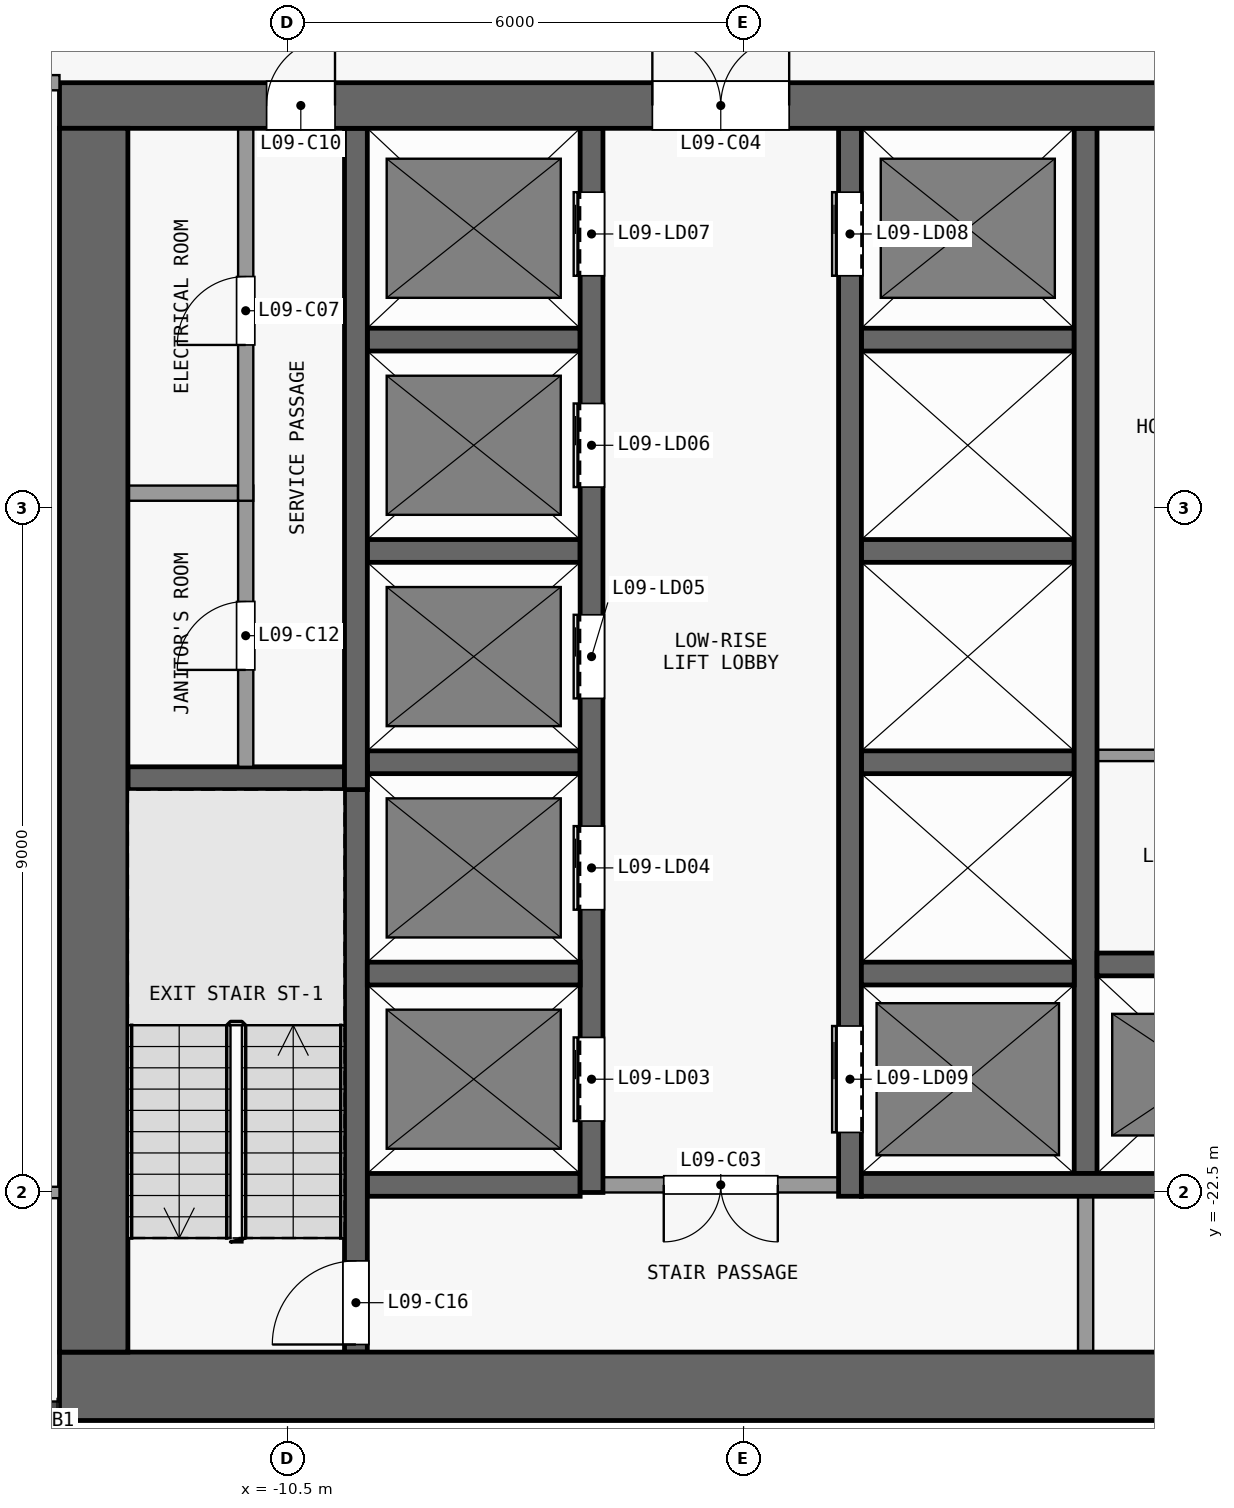
"""IFC4 building model, lengths in metres.
Left out: names, types, materials, properties, quantities, classifications, styles, units other than length and angle.
Written with IfcOpenShell. Run it as: python <this file> out.ifc"""

import sys

from ifc_helpers import new_model, si_unit, direction, frame, frame_2d, origin, place, context, subcontext, project, spatial, rectangle, extrude, element, fill, save


model = new_model("IFC4")
c1 = context("Model", 3, precision=1e-05, world=origin(), true_north=direction((0.0, 1.0)))
c2 = subcontext(c1, "Body", "Model", "MODEL_VIEW")
j1 = project(units=[si_unit("LENGTHUNIT", "METRE"), si_unit("PLANEANGLEUNIT", "RADIAN")], contexts=[c1])
p1 = place(None, origin())
s1 = spatial("IfcSite", under=j1, at=p1, CompositionType="ELEMENT")
p2 = place(p1, origin())
s2 = spatial("IfcBuilding", under=s1, at=p2, CompositionType="ELEMENT")
p3 = place(p2, frame((0.0, 0.0, 43.3)))
s3 = spatial("IfcBuildingStorey", under=s2, at=p3, CompositionType="ELEMENT", Elevation=43.3)
p4 = place(p3, frame((-13.5, -25.05, 0.0), z_axis=(0.0, 0.0, 1.0), x_axis=(1.0, 0.0, 0.0)))
e1 = element("IfcWall", 1, at=p4, inside=s3, PredefinedType="SHEAR", context=c2, shape_type="SweptSolid", body=[
    extrude(rectangle(XDim=27.0, YDim=0.9, at=frame_2d((13.5, 0.0))), origin(), (0.0, 0.0, 1.0), 3.3),
])
p5 = place(p3, frame((-13.5, -8.2, 0.0), z_axis=(0.0, 0.0, 1.0), x_axis=(1.0, 0.0, 0.0)))
e2 = element("IfcWall", 2, at=p5, inside=s3, PredefinedType="SHEAR", context=c2, shape_type="SweptSolid", body=[
    extrude(rectangle(XDim=27.0, YDim=0.6, at=frame_2d((13.5, 0.0))), origin(), (0.0, 0.0, 1.0), 3.3),
])
p6 = place(p5, frame((7.8, 0.0, 0.0)))
e3 = element("IfcOpeningElement", 3, at=p6, cuts=e2, PredefinedType="OPENING", context=c2, shape_type="SweptSolid", body=[
    extrude(rectangle(XDim=1.8, YDim=2.1, at=frame_2d((0.9, 1.05))), frame((0.0, 0.31, 0.0), z_axis=(0.0, -1.0, 0.0), x_axis=(1.0, 0.0, 0.0)), (0.0, 0.0, 1.0), 0.62),
])
p7 = place(p5, frame((17.4, 0.0, 0.0)))
e4 = element("IfcOpeningElement", 4, at=p7, cuts=e2, PredefinedType="OPENING", context=c2, shape_type="SweptSolid", body=[
    extrude(rectangle(XDim=1.8, YDim=2.1, at=frame_2d((0.9, 1.05))), frame((0.0, 0.31, 0.0), z_axis=(0.0, -1.0, 0.0), x_axis=(1.0, 0.0, 0.0)), (0.0, 0.0, 1.0), 0.62),
])
p8 = place(p5, frame((2.725, 0.0, 0.0)))
e5 = element("IfcOpeningElement", 5, at=p8, cuts=e2, PredefinedType="OPENING", context=c2, shape_type="SweptSolid", body=[
    extrude(rectangle(XDim=0.9, YDim=2.1, at=frame_2d((0.45, 1.05))), frame((0.0, 0.31, 0.0), z_axis=(0.0, -1.0, 0.0), x_axis=(1.0, 0.0, 0.0)), (0.0, 0.0, 1.0), 0.62),
])
p9 = place(p5, frame((23.375, 0.0, 0.0)))
e6 = element("IfcOpeningElement", 6, at=p9, cuts=e2, PredefinedType="OPENING", context=c2, shape_type="SweptSolid", body=[
    extrude(rectangle(XDim=0.9, YDim=2.1, at=frame_2d((0.45, 1.05))), frame((0.0, 0.31, 0.0), z_axis=(0.0, -1.0, 0.0), x_axis=(1.0, 0.0, 0.0)), (0.0, 0.0, 1.0), 0.62),
])
p10 = place(p3, frame((-13.05, -24.6, 0.0), z_axis=(0.0, 0.0, 1.0), x_axis=(0.0, 1.0, 0.0)))
e7 = element("IfcWall", 7, at=p10, inside=s3, PredefinedType="SHEAR", context=c2, shape_type="SweptSolid", body=[
    extrude(rectangle(XDim=16.1, YDim=0.9, at=frame_2d((8.05, 0.0))), origin(), (0.0, 0.0, 1.0), 3.3),
])
p11 = place(p3, frame((-9.45, -22.4, 0.0), z_axis=(0.0, 0.0, 1.0), x_axis=(1.0, 0.0, 0.0)))
e8 = element("IfcWall", 8, at=p11, inside=s3, PredefinedType="SHEAR", context=c2, shape_type="SweptSolid", body=[
    extrude(rectangle(XDim=2.8, YDim=0.3, at=frame_2d((1.4, 0.0))), origin(), (0.0, 0.0, 1.0), 3.3),
])
p12 = place(p3, frame((-3.25, -22.4, 0.0), z_axis=(0.0, 0.0, 1.0), x_axis=(-1.0, 0.0, 0.0)))
e9 = element("IfcWall", 9, at=p12, inside=s3, PredefinedType="PARTITIONING", context=c2, shape_type="SweptSolid", body=[
    extrude(rectangle(XDim=3.1, YDim=0.2, at=frame_2d((1.55, 0.0))), origin(), (0.0, 0.0, 1.0), 3.3),
])
p13 = place(p12, frame((0.8, 0.0, 0.0)))
e10 = element("IfcOpeningElement", 10, at=p13, cuts=e9, PredefinedType="OPENING", context=c2, shape_type="SweptSolid", body=[
    extrude(rectangle(XDim=1.5, YDim=2.1, at=frame_2d((0.75, 1.05))), frame((0.0, 0.11, 0.0), z_axis=(0.0, -1.0, 0.0), x_axis=(1.0, 0.0, 0.0)), (0.0, 0.0, 1.0), 0.22),
])
p14 = place(p3, frame((-2.95, -22.4, 0.0), z_axis=(0.0, 0.0, 1.0), x_axis=(1.0, 0.0, 0.0)))
e11 = element("IfcWall", 11, at=p14, inside=s3, PredefinedType="SHEAR", context=c2, shape_type="SweptSolid", body=[
    extrude(rectangle(XDim=6.2, YDim=0.3, at=frame_2d((3.1, 0.0))), origin(), (0.0, 0.0, 1.0), 3.3),
])
for number, where, z_axis, x_axis in (
    (12, (-9.45, -19.62, 0.0), (0.0, 0.0, 1.0), (1.0, 0.0, 0.0)),
    (13, (-2.95, -19.62, 0.0), (0.0, 0.0, 1.0), (1.0, 0.0, 0.0)),
):
    element("IfcWall", number, at=place(p3, frame(where, z_axis=z_axis, x_axis=x_axis)), inside=s3, PredefinedType="SHEAR", context=c2, shape_type="SweptSolid", body=[
        extrude(rectangle(XDim=2.8, YDim=0.3, at=frame_2d((1.4, 0.0))), origin(), (0.0, 0.0, 1.0), 3.3),
    ])
p15 = place(p3, frame((0.15, -19.5, 0.0), z_axis=(0.0, 0.0, 1.0), x_axis=(1.0, 0.0, 0.0)))
e14 = element("IfcWall", 14, at=p15, inside=s3, PredefinedType="SHEAR", context=c2, shape_type="SweptSolid", body=[
    extrude(rectangle(XDim=3.025, YDim=0.3, at=frame_2d((1.513, 0.0))), origin(), (0.0, 0.0, 1.0), 3.3),
])
p16 = place(p3, frame((-12.6, -17.05, 0.0), z_axis=(0.0, 0.0, 1.0), x_axis=(1.0, 0.0, 0.0)))
e15 = element("IfcWall", 15, at=p16, inside=s3, PredefinedType="SHEAR", context=c2, shape_type="SweptSolid", body=[
    extrude(rectangle(XDim=2.85, YDim=0.3, at=frame_2d((1.425, 0.0))), origin(), (0.0, 0.0, 1.0), 3.3),
])
for number, where, z_axis, x_axis in (
    (16, (-9.45, -16.84, 0.0), (0.0, 0.0, 1.0), (1.0, 0.0, 0.0)),
    (17, (-2.95, -16.84, 0.0), (0.0, 0.0, 1.0), (1.0, 0.0, 0.0)),
):
    element("IfcWall", number, at=place(p3, frame(where, z_axis=z_axis, x_axis=x_axis)), inside=s3, PredefinedType="SHEAR", context=c2, shape_type="SweptSolid", body=[
        extrude(rectangle(XDim=2.8, YDim=0.3, at=frame_2d((1.4, 0.0))), origin(), (0.0, 0.0, 1.0), 3.3),
    ])
p17 = place(p3, frame((0.15, -16.75, 0.0), z_axis=(0.0, 0.0, 1.0), x_axis=(1.0, 0.0, 0.0)))
e18 = element("IfcWall", 18, at=p17, inside=s3, PredefinedType="PARTITIONING", context=c2, shape_type="SweptSolid", body=[
    extrude(rectangle(XDim=2.875, YDim=0.15, at=frame_2d((1.438, 0.0))), origin(), (0.0, 0.0, 1.0), 3.3),
])
for number, where, z_axis, x_axis in (
    (19, (-9.45, -14.06, 0.0), (0.0, 0.0, 1.0), (1.0, 0.0, 0.0)),
    (20, (-2.95, -14.06, 0.0), (0.0, 0.0, 1.0), (1.0, 0.0, 0.0)),
):
    element("IfcWall", number, at=place(p3, frame(where, z_axis=z_axis, x_axis=x_axis)), inside=s3, PredefinedType="SHEAR", context=c2, shape_type="SweptSolid", body=[
        extrude(rectangle(XDim=2.8, YDim=0.3, at=frame_2d((1.4, 0.0))), origin(), (0.0, 0.0, 1.0), 3.3),
    ])
p18 = place(p3, frame((-12.6, -13.3, 0.0), z_axis=(0.0, 0.0, 1.0), x_axis=(1.0, 0.0, 0.0)))
e21 = element("IfcWall", 21, at=p18, inside=s3, PredefinedType="PARTITIONING", context=c2, shape_type="SweptSolid", body=[
    extrude(rectangle(XDim=1.45, YDim=0.2, at=frame_2d((0.725, 0.0))), origin(), (0.0, 0.0, 1.0), 3.3),
])
for number, where, z_axis, x_axis in (
    (22, (-9.45, -11.28, 0.0), (0.0, 0.0, 1.0), (1.0, 0.0, 0.0)),
    (23, (-2.95, -11.28, 0.0), (0.0, 0.0, 1.0), (1.0, 0.0, 0.0)),
):
    element("IfcWall", number, at=place(p3, frame(where, z_axis=z_axis, x_axis=x_axis)), inside=s3, PredefinedType="SHEAR", context=c2, shape_type="SweptSolid", body=[
        extrude(rectangle(XDim=2.8, YDim=0.3, at=frame_2d((1.4, 0.0))), origin(), (0.0, 0.0, 1.0), 3.3),
    ])
p19 = place(p3, frame((-11.05, -16.9, 0.0), z_axis=(0.0, 0.0, 1.0), x_axis=(0.0, 1.0, 0.0)))
e24 = element("IfcWall", 24, at=p19, inside=s3, PredefinedType="PARTITIONING", context=c2, shape_type="SweptSolid", body=[
    extrude(rectangle(XDim=3.7, YDim=0.2, at=frame_2d((1.85, 0.0))), origin(), (0.0, 0.0, 1.0), 3.3),
])
p20 = place(p19, frame((1.275, 0.0, 0.0)))
e25 = element("IfcOpeningElement", 25, at=p20, cuts=e24, PredefinedType="OPENING", context=c2, shape_type="SweptSolid", body=[
    extrude(rectangle(XDim=0.9, YDim=2.1, at=frame_2d((0.45, 1.05))), frame((0.0, 0.11, 0.0), z_axis=(0.0, -1.0, 0.0), x_axis=(1.0, 0.0, 0.0)), (0.0, 0.0, 1.0), 0.22),
])
p21 = place(p3, frame((-11.05, -13.4, 0.0), z_axis=(0.0, 0.0, 1.0), x_axis=(0.0, 1.0, 0.0)))
e26 = element("IfcWall", 26, at=p21, inside=s3, PredefinedType="PARTITIONING", context=c2, shape_type="SweptSolid", body=[
    extrude(rectangle(XDim=4.9, YDim=0.2, at=frame_2d((2.45, 0.0))), origin(), (0.0, 0.0, 1.0), 3.3),
])
p22 = place(p21, frame((2.05, 0.0, 0.0)))
e27 = element("IfcOpeningElement", 27, at=p22, cuts=e26, PredefinedType="OPENING", context=c2, shape_type="SweptSolid", body=[
    extrude(rectangle(XDim=0.9, YDim=2.1, at=frame_2d((0.45, 1.05))), frame((0.0, 0.11, 0.0), z_axis=(0.0, -1.0, 0.0), x_axis=(1.0, 0.0, 0.0)), (0.0, 0.0, 1.0), 0.22),
])
p23 = place(p3, frame((-9.6, -24.6, 0.0), z_axis=(0.0, 0.0, 1.0), x_axis=(0.0, 1.0, 0.0)))
e28 = element("IfcWall", 28, at=p23, inside=s3, PredefinedType="SHEAR", context=c2, shape_type="SweptSolid", body=[
    extrude(rectangle(XDim=7.7, YDim=0.3, at=frame_2d((3.85, 0.0))), origin(), (0.0, 0.0, 1.0), 3.3),
])
p24 = place(p23, frame((0.1, 0.0, 0.0)))
e29 = element("IfcOpeningElement", 29, at=p24, cuts=e28, PredefinedType="OPENING", context=c2, shape_type="SweptSolid", body=[
    extrude(rectangle(XDim=1.1, YDim=2.1, at=frame_2d((0.55, 1.05))), frame((0.0, 0.16, 0.0), z_axis=(0.0, -1.0, 0.0), x_axis=(1.0, 0.0, 0.0)), (0.0, 0.0, 1.0), 0.32),
])
p25 = place(p3, frame((-9.6, -17.2, 0.0), z_axis=(0.0, 0.0, 1.0), x_axis=(0.0, 1.0, 0.0)))
e30 = element("IfcWall", 30, at=p25, inside=s3, PredefinedType="SHEAR", context=c2, shape_type="SweptSolid", body=[
    extrude(rectangle(XDim=8.7, YDim=0.3, at=frame_2d((4.35, 0.0))), origin(), (0.0, 0.0, 1.0), 3.3),
])
p26 = place(p3, frame((-6.5, -22.5, 0.0), z_axis=(0.0, 0.0, 1.0), x_axis=(0.0, 1.0, 0.0)))
e31 = element("IfcWall", 31, at=p26, inside=s3, PredefinedType="SHEAR", context=c2, shape_type="SweptSolid", body=[
    extrude(rectangle(XDim=14.0, YDim=0.3, at=frame_2d((7.0, 0.0))), origin(), (0.0, 0.0, 1.0), 3.3),
])
p27 = place(p26, frame((0.94, 0.0, 0.0)))
e32 = element("IfcOpeningElement", 32, at=p27, cuts=e31, PredefinedType="OPENING", context=c2, shape_type="SweptSolid", body=[
    extrude(rectangle(XDim=1.1, YDim=2.1, at=frame_2d((0.55, 1.05))), frame((0.0, 0.16, 0.0), z_axis=(0.0, -1.0, 0.0), x_axis=(1.0, 0.0, 0.0)), (0.0, 0.0, 1.0), 0.32),
])
p28 = place(p26, frame((3.72, 0.0, 0.0)))
e33 = element("IfcOpeningElement", 33, at=p28, cuts=e31, PredefinedType="OPENING", context=c2, shape_type="SweptSolid", body=[
    extrude(rectangle(XDim=1.1, YDim=2.1, at=frame_2d((0.55, 1.05))), frame((0.0, 0.16, 0.0), z_axis=(0.0, -1.0, 0.0), x_axis=(1.0, 0.0, 0.0)), (0.0, 0.0, 1.0), 0.32),
])
p29 = place(p26, frame((6.5, 0.0, 0.0)))
e34 = element("IfcOpeningElement", 34, at=p29, cuts=e31, PredefinedType="OPENING", context=c2, shape_type="SweptSolid", body=[
    extrude(rectangle(XDim=1.1, YDim=2.1, at=frame_2d((0.55, 1.05))), frame((0.0, 0.16, 0.0), z_axis=(0.0, -1.0, 0.0), x_axis=(1.0, 0.0, 0.0)), (0.0, 0.0, 1.0), 0.32),
])
p30 = place(p26, frame((9.28, 0.0, 0.0)))
e35 = element("IfcOpeningElement", 35, at=p30, cuts=e31, PredefinedType="OPENING", context=c2, shape_type="SweptSolid", body=[
    extrude(rectangle(XDim=1.1, YDim=2.1, at=frame_2d((0.55, 1.05))), frame((0.0, 0.16, 0.0), z_axis=(0.0, -1.0, 0.0), x_axis=(1.0, 0.0, 0.0)), (0.0, 0.0, 1.0), 0.32),
])
p31 = place(p26, frame((12.06, 0.0, 0.0)))
e36 = element("IfcOpeningElement", 36, at=p31, cuts=e31, PredefinedType="OPENING", context=c2, shape_type="SweptSolid", body=[
    extrude(rectangle(XDim=1.1, YDim=2.1, at=frame_2d((0.55, 1.05))), frame((0.0, 0.16, 0.0), z_axis=(0.0, -1.0, 0.0), x_axis=(1.0, 0.0, 0.0)), (0.0, 0.0, 1.0), 0.32),
])
p32 = place(p3, frame((-3.1, -22.55, 0.0), z_axis=(0.0, 0.0, 1.0), x_axis=(0.0, 1.0, 0.0)))
e37 = element("IfcWall", 37, at=p32, inside=s3, PredefinedType="SHEAR", context=c2, shape_type="SweptSolid", body=[
    extrude(rectangle(XDim=14.05, YDim=0.3, at=frame_2d((7.025, 0.0))), origin(), (0.0, 0.0, 1.0), 3.3),
])
p33 = place(p32, frame((12.11, 0.0, 0.0)))
e38 = element("IfcOpeningElement", 38, at=p33, cuts=e37, PredefinedType="OPENING", context=c2, shape_type="SweptSolid", body=[
    extrude(rectangle(XDim=1.1, YDim=2.1, at=frame_2d((0.55, 1.05))), frame((0.0, 0.16, 0.0), z_axis=(0.0, -1.0, 0.0), x_axis=(1.0, 0.0, 0.0)), (0.0, 0.0, 1.0), 0.32),
])
p34 = place(p32, frame((0.84, 0.0, 0.0)))
e39 = element("IfcOpeningElement", 39, at=p34, cuts=e37, PredefinedType="OPENING", context=c2, shape_type="SweptSolid", body=[
    extrude(rectangle(XDim=1.4, YDim=2.1, at=frame_2d((0.7, 1.05))), frame((0.0, 0.16, 0.0), z_axis=(0.0, -1.0, 0.0), x_axis=(1.0, 0.0, 0.0)), (0.0, 0.0, 1.0), 0.32),
])
p35 = place(p3, frame((0.0, -24.6, 0.0), z_axis=(0.0, 0.0, 1.0), x_axis=(0.0, 1.0, 0.0)))
e40 = element("IfcWall", 40, at=p35, inside=s3, PredefinedType="PARTITIONING", context=c2, shape_type="SweptSolid", body=[
    extrude(rectangle(XDim=2.05, YDim=0.2, at=frame_2d((1.025, 0.0))), origin(), (0.0, 0.0, 1.0), 3.3),
])
p36 = place(p3, frame((0.0, -22.25, 0.0), z_axis=(0.0, 0.0, 1.0), x_axis=(0.0, 1.0, 0.0)))
e41 = element("IfcWall", 41, at=p36, inside=s3, PredefinedType="SHEAR", context=c2, shape_type="SweptSolid", body=[
    extrude(rectangle(XDim=13.75, YDim=0.3, at=frame_2d((6.875, 0.0))), origin(), (0.0, 0.0, 1.0), 3.3),
])
p37 = place(p3, frame((-16.425, -22.5, 0.0), z_axis=(0.0, 0.0, 1.0), x_axis=(1.0, 0.0, 0.0)))
e42 = element("IfcWall", 42, at=p37, inside=s3, PredefinedType="PARTITIONING", context=c2, shape_type="SweptSolid", body=[
    extrude(rectangle(XDim=2.925, YDim=0.15, at=frame_2d((1.462, 0.0))), origin(), (0.0, 0.0, 1.0), 3.3),
])
p38 = place(p37, frame((1.0, 0.0, 0.0)))
e43 = element("IfcOpeningElement", 43, at=p38, cuts=e42, PredefinedType="OPENING", context=c2, shape_type="SweptSolid", body=[
    extrude(rectangle(XDim=0.9, YDim=2.1, at=frame_2d((0.45, 1.05))), frame((0.0, 0.085, 0.0), z_axis=(0.0, -1.0, 0.0), x_axis=(1.0, 0.0, 0.0)), (0.0, 0.0, 1.0), 0.17),
])
p39 = place(p3, frame((-25.25, -7.9, 0.0), z_axis=(0.0, 0.0, 1.0), x_axis=(1.0, 0.0, 0.0)))
e44 = element("IfcWall", 44, at=p39, inside=s3, PredefinedType="PARTITIONING", context=c2, shape_type="SweptSolid", body=[
    extrude(rectangle(XDim=11.75, YDim=0.2, at=frame_2d((5.875, 0.0))), origin(), (0.0, 0.0, 1.0), 3.3),
])
p40 = place(p39, frame((9.75, 0.0, 0.0)))
e45 = element("IfcOpeningElement", 45, at=p40, cuts=e44, PredefinedType="OPENING", context=c2, shape_type="SweptSolid", body=[
    extrude(rectangle(XDim=1.0, YDim=2.1, at=frame_2d((0.5, 1.05))), frame((0.0, 0.11, 0.0), z_axis=(0.0, -1.0, 0.0), x_axis=(1.0, 0.0, 0.0)), (0.0, 0.0, 1.0), 0.22),
])
p41 = place(p27, origin())
e46 = element("IfcDoor", 46, at=p41, inside=s3, OperationType="DOUBLE_DOOR_SLIDING", PredefinedType="DOOR", context=c2, shape_type="SweptSolid", body=[
    extrude(rectangle(XDim=1.1, YDim=2.1, at=frame_2d((0.55, 1.05))), frame((0.0, 0.025, 0.0), z_axis=(0.0, -1.0, 0.0), x_axis=(1.0, 0.0, 0.0)), (0.0, 0.0, 1.0), 0.05),
])
fill(e32, e46)
p42 = place(p28, origin())
e47 = element("IfcDoor", 47, at=p42, inside=s3, OperationType="DOUBLE_DOOR_SLIDING", PredefinedType="DOOR", context=c2, shape_type="SweptSolid", body=[
    extrude(rectangle(XDim=1.1, YDim=2.1, at=frame_2d((0.55, 1.05))), frame((0.0, 0.025, 0.0), z_axis=(0.0, -1.0, 0.0), x_axis=(1.0, 0.0, 0.0)), (0.0, 0.0, 1.0), 0.05),
])
fill(e33, e47)
p43 = place(p29, origin())
e48 = element("IfcDoor", 48, at=p43, inside=s3, OperationType="DOUBLE_DOOR_SLIDING", PredefinedType="DOOR", context=c2, shape_type="SweptSolid", body=[
    extrude(rectangle(XDim=1.1, YDim=2.1, at=frame_2d((0.55, 1.05))), frame((0.0, 0.025, 0.0), z_axis=(0.0, -1.0, 0.0), x_axis=(1.0, 0.0, 0.0)), (0.0, 0.0, 1.0), 0.05),
])
fill(e34, e48)
p44 = place(p30, origin())
e49 = element("IfcDoor", 49, at=p44, inside=s3, OperationType="DOUBLE_DOOR_SLIDING", PredefinedType="DOOR", context=c2, shape_type="SweptSolid", body=[
    extrude(rectangle(XDim=1.1, YDim=2.1, at=frame_2d((0.55, 1.05))), frame((0.0, 0.025, 0.0), z_axis=(0.0, -1.0, 0.0), x_axis=(1.0, 0.0, 0.0)), (0.0, 0.0, 1.0), 0.05),
])
fill(e35, e49)
p45 = place(p31, origin())
e50 = element("IfcDoor", 50, at=p45, inside=s3, OperationType="DOUBLE_DOOR_SLIDING", PredefinedType="DOOR", context=c2, shape_type="SweptSolid", body=[
    extrude(rectangle(XDim=1.1, YDim=2.1, at=frame_2d((0.55, 1.05))), frame((0.0, 0.025, 0.0), z_axis=(0.0, -1.0, 0.0), x_axis=(1.0, 0.0, 0.0)), (0.0, 0.0, 1.0), 0.05),
])
fill(e36, e50)
p46 = place(p33, origin())
e51 = element("IfcDoor", 51, at=p46, inside=s3, OperationType="DOUBLE_DOOR_SLIDING", PredefinedType="DOOR", context=c2, shape_type="SweptSolid", body=[
    extrude(rectangle(XDim=1.1, YDim=2.1, at=frame_2d((0.55, 1.05))), frame((0.0, 0.025, 0.0), z_axis=(0.0, -1.0, 0.0), x_axis=(1.0, 0.0, 0.0)), (0.0, 0.0, 1.0), 0.05),
])
fill(e38, e51)
p47 = place(p34, origin())
e52 = element("IfcDoor", 52, at=p47, inside=s3, OperationType="DOUBLE_DOOR_SLIDING", PredefinedType="DOOR", context=c2, shape_type="SweptSolid", body=[
    extrude(rectangle(XDim=1.4, YDim=2.1, at=frame_2d((0.7, 1.05))), frame((0.0, 0.025, 0.0), z_axis=(0.0, -1.0, 0.0), x_axis=(1.0, 0.0, 0.0)), (0.0, 0.0, 1.0), 0.05),
])
fill(e39, e52)
p48 = place(p13, origin())
e53 = element("IfcDoor", 53, at=p48, inside=s3, OperationType="DOUBLE_DOOR_SINGLE_SWING", PredefinedType="DOOR", context=c2, shape_type="SweptSolid", body=[
    extrude(rectangle(XDim=1.5, YDim=2.1, at=frame_2d((0.75, 1.05))), frame((0.0, 0.025, 0.0), z_axis=(0.0, -1.0, 0.0), x_axis=(1.0, 0.0, 0.0)), (0.0, 0.0, 1.0), 0.05),
])
fill(e10, e53)
p49 = place(p6, origin())
e54 = element("IfcDoor", 54, at=p49, inside=s3, OperationType="DOUBLE_DOOR_SINGLE_SWING", PredefinedType="DOOR", context=c2, shape_type="SweptSolid", body=[
    extrude(rectangle(XDim=1.8, YDim=2.1, at=frame_2d((0.9, 1.05))), frame((0.0, 0.025, 0.0), z_axis=(0.0, -1.0, 0.0), x_axis=(1.0, 0.0, 0.0)), (0.0, 0.0, 1.0), 0.05),
])
fill(e3, e54)
p50 = place(p22, origin())
e55 = element("IfcDoor", 55, at=p50, inside=s3, OperationType="SINGLE_SWING_LEFT", PredefinedType="DOOR", context=c2, shape_type="SweptSolid", body=[
    extrude(rectangle(XDim=0.9, YDim=2.1, at=frame_2d((0.45, 1.05))), frame((0.0, 0.025, 0.0), z_axis=(0.0, -1.0, 0.0), x_axis=(1.0, 0.0, 0.0)), (0.0, 0.0, 1.0), 0.05),
])
fill(e27, e55)
p51 = place(p8, origin())
e56 = element("IfcDoor", 56, at=p51, inside=s3, OperationType="SINGLE_SWING_RIGHT", PredefinedType="DOOR", context=c2, shape_type="SweptSolid", body=[
    extrude(rectangle(XDim=0.9, YDim=2.1, at=frame_2d((0.45, 1.05))), frame((0.0, 0.025, 0.0), z_axis=(0.0, -1.0, 0.0), x_axis=(1.0, 0.0, 0.0)), (0.0, 0.0, 1.0), 0.05),
])
fill(e5, e56)
p52 = place(p20, origin())
e57 = element("IfcDoor", 57, at=p52, inside=s3, OperationType="SINGLE_SWING_LEFT", PredefinedType="DOOR", context=c2, shape_type="SweptSolid", body=[
    extrude(rectangle(XDim=0.9, YDim=2.1, at=frame_2d((0.45, 1.05))), frame((0.0, 0.025, 0.0), z_axis=(0.0, -1.0, 0.0), x_axis=(1.0, 0.0, 0.0)), (0.0, 0.0, 1.0), 0.05),
])
fill(e25, e57)
p53 = place(p24, origin())
e58 = element("IfcDoor", 58, at=p53, inside=s3, OperationType="SINGLE_SWING_LEFT", PredefinedType="DOOR", context=c2, shape_type="SweptSolid", body=[
    extrude(rectangle(XDim=1.1, YDim=2.1, at=frame_2d((0.55, 1.05))), frame((0.0, 0.025, 0.0), z_axis=(0.0, -1.0, 0.0), x_axis=(1.0, 0.0, 0.0)), (0.0, 0.0, 1.0), 0.05),
])
fill(e29, e58)
save(model, sys.argv[1])
